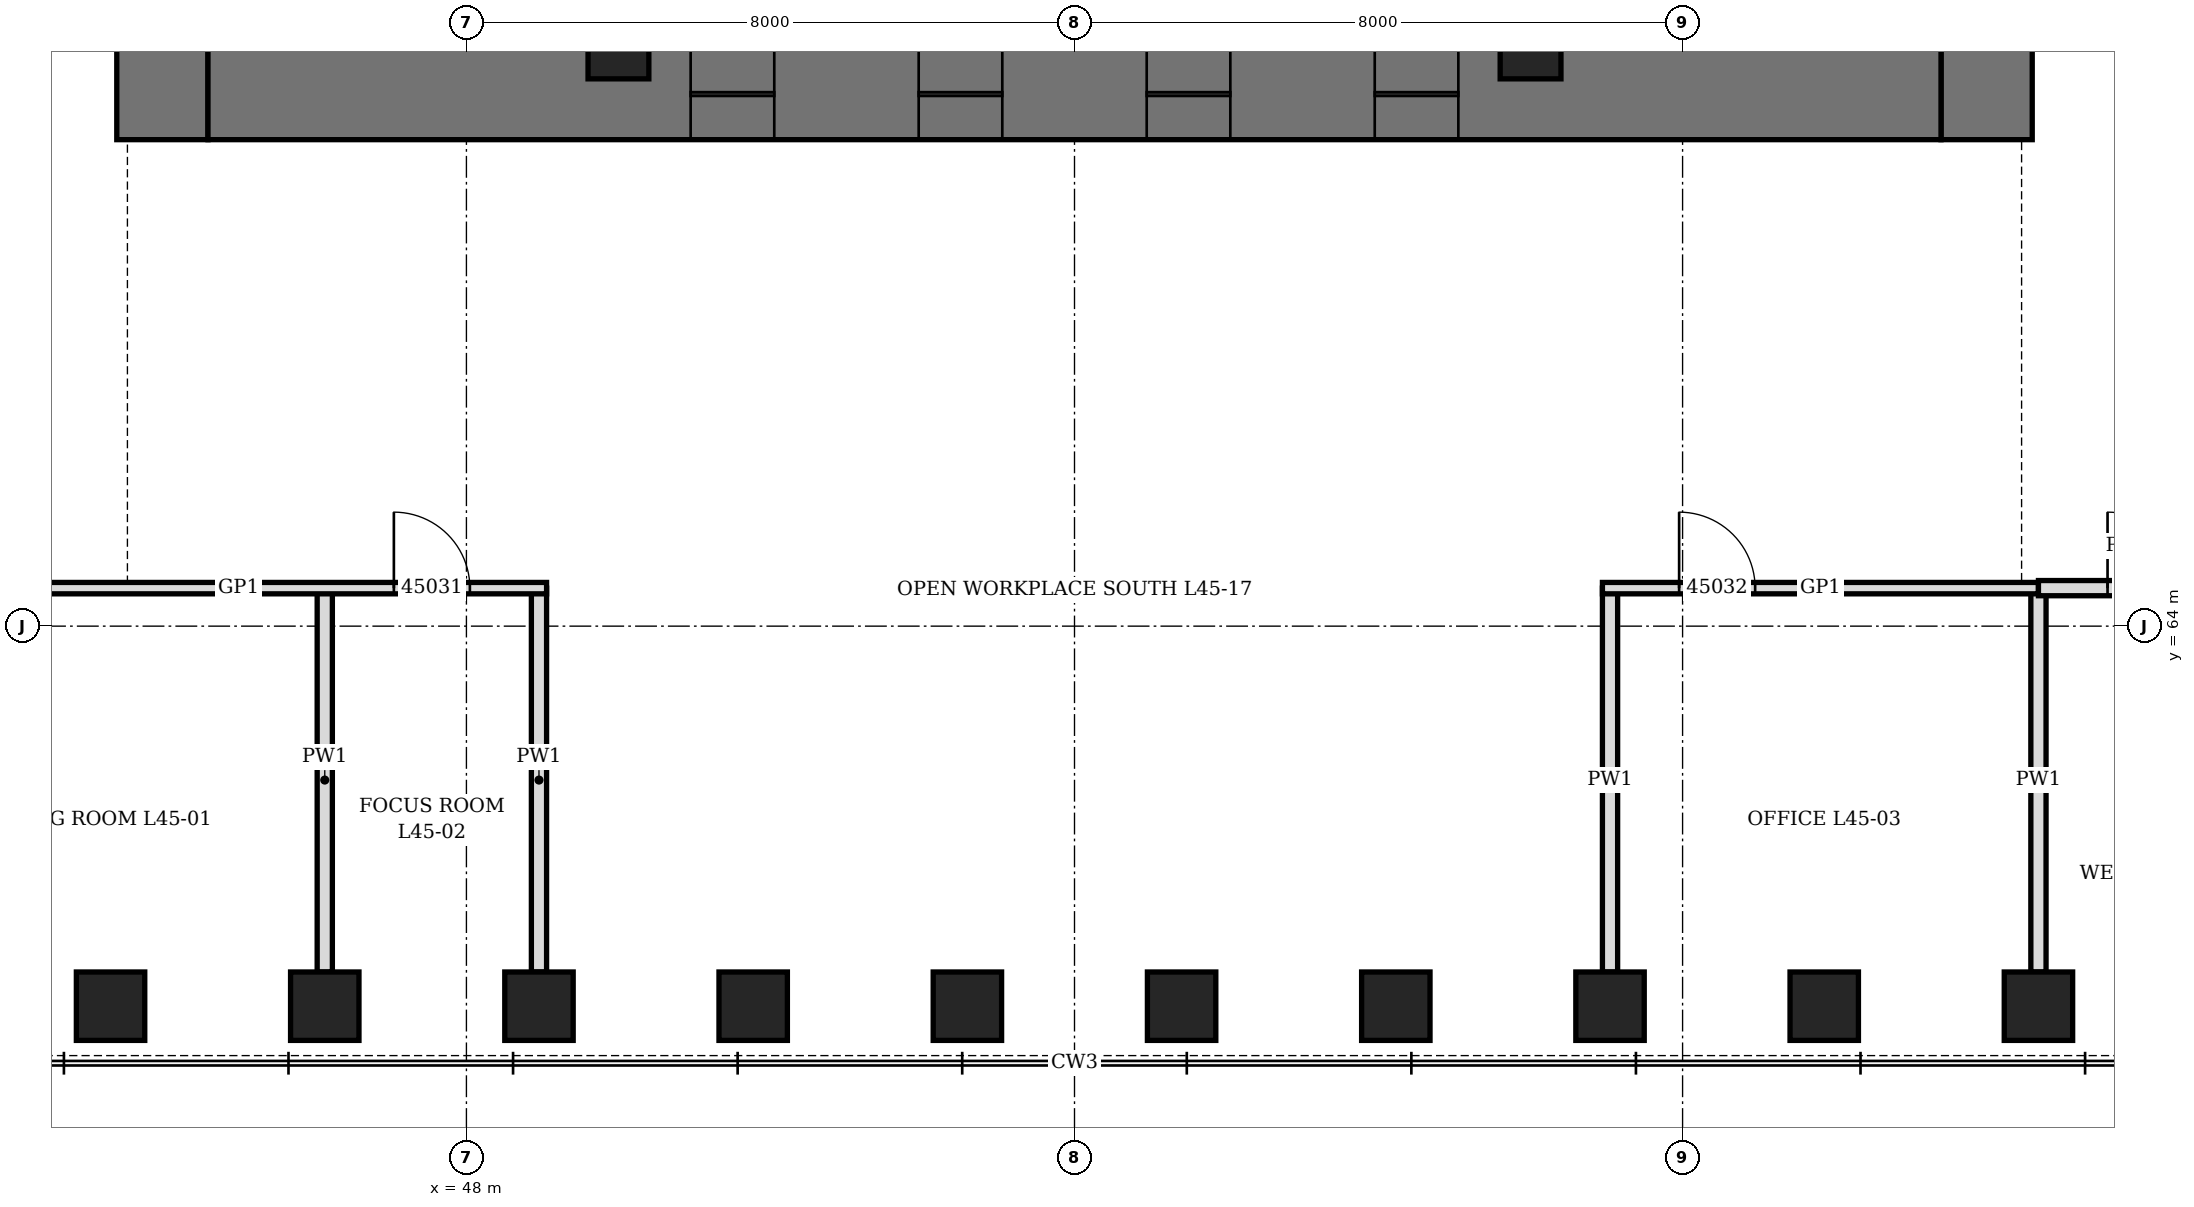
"""IFC4 building model, lengths in metres.
Left out: names, types, materials, properties, quantities, classifications, styles, units other than length and angle.
Written with IfcOpenShell. Run it as: python <this file> out.ifc"""

import sys

from ifc_helpers import new_model, si_unit, direction, frame, frame_2d, origin, origin_2d, place, context, subcontext, project, spatial, rectangle, hollow_rectangle, extrude, element, fill, save


model = new_model("IFC4")
c1 = context("Model", 3, precision=1e-05, world=origin(), true_north=direction((0.0, 1.0)))
c2 = subcontext(c1, "Body", "Model", "MODEL_VIEW")
j1 = project(units=[si_unit("LENGTHUNIT", "METRE"), si_unit("PLANEANGLEUNIT", "RADIAN")], contexts=[c1])
p1 = place(None, origin())
s1 = spatial("IfcSite", under=j1, at=p1, CompositionType="ELEMENT")
p2 = place(p1, origin())
s2 = spatial("IfcBuilding", under=s1, at=p2, CompositionType="ELEMENT")
p3 = place(p2, frame((0.0, 0.0, 202.3)))
s3 = spatial("IfcBuildingStorey", under=s2, at=p3, CompositionType="ELEMENT", Elevation=202.3)
for number, where, z_axis, x_axis in (
    (1, (43.318, 59.0, 0.0), (0.0, 0.0, 1.0), (1.0, 0.0, 0.0)),
    (2, (46.136, 59.0, 0.0), (0.0, 0.0, 1.0), (1.0, 0.0, 0.0)),
    (3, (48.955, 59.0, 0.0), (0.0, 0.0, 1.0), (1.0, 0.0, 0.0)),
    (4, (51.773, 59.0, 0.0), (0.0, 0.0, 1.0), (1.0, 0.0, 0.0)),
    (5, (54.591, 59.0, 0.0), (0.0, 0.0, 1.0), (1.0, 0.0, 0.0)),
    (6, (57.409, 59.0, 0.0), (0.0, 0.0, 1.0), (1.0, 0.0, 0.0)),
    (7, (60.227, 59.0, 0.0), (0.0, 0.0, 1.0), (1.0, 0.0, 0.0)),
    (8, (63.045, 59.0, 0.0), (0.0, 0.0, 1.0), (1.0, 0.0, 0.0)),
    (9, (65.864, 59.0, 0.0), (0.0, 0.0, 1.0), (1.0, 0.0, 0.0)),
    (10, (68.682, 59.0, 0.0), (0.0, 0.0, 1.0), (1.0, 0.0, 0.0)),
):
    element("IfcColumn", number, at=place(p3, frame(where, z_axis=z_axis, x_axis=x_axis)), inside=s3, PredefinedType="COLUMN", context=c2, shape_type="SweptSolid", body=[
        extrude(hollow_rectangle(XDim=0.9, YDim=0.9, WallThickness=0.12, at=origin_2d()), origin(), (0.0, 0.0, 1.0), 4.2),
    ])
p4 = place(p3, frame((44.0, 70.4, 0.0), z_axis=(0.0, 0.0, 1.0), x_axis=(0.0, 1.0, 0.0)))
e11 = element("IfcWall", 11, at=p4, inside=s3, PredefinedType="SHEAR", context=c2, shape_type="SweptSolid", body=[
    extrude(rectangle(XDim=19.2, YDim=1.2, at=frame_2d((9.6, 0.0))), origin(), (0.0, 0.0, 1.0), 4.2),
])
p5 = place(p4, frame((8.6, 0.0, 0.0)))
e12 = element("IfcOpeningElement", 12, at=p5, cuts=e11, PredefinedType="OPENING", context=c2, shape_type="SweptSolid", body=[
    extrude(rectangle(XDim=2.0, YDim=2.4, at=frame_2d((1.0, 1.2))), frame((0.0, 0.61, 0.0), z_axis=(0.0, -1.0, 0.0), x_axis=(1.0, 0.0, 0.0)), (0.0, 0.0, 1.0), 1.22),
])
p6 = place(p3, frame((68.0, 70.4, 0.0), z_axis=(0.0, 0.0, 1.0), x_axis=(0.0, 1.0, 0.0)))
e13 = element("IfcWall", 13, at=p6, inside=s3, PredefinedType="SHEAR", context=c2, shape_type="SweptSolid", body=[
    extrude(rectangle(XDim=19.2, YDim=1.2, at=frame_2d((9.6, 0.0))), origin(), (0.0, 0.0, 1.0), 4.2),
])
p7 = place(p6, frame((8.6, 0.0, 0.0)))
e14 = element("IfcOpeningElement", 14, at=p7, cuts=e13, PredefinedType="OPENING", context=c2, shape_type="SweptSolid", body=[
    extrude(rectangle(XDim=2.0, YDim=2.4, at=frame_2d((1.0, 1.2))), frame((0.0, 0.61, 0.0), z_axis=(0.0, -1.0, 0.0), x_axis=(1.0, 0.0, 0.0)), (0.0, 0.0, 1.0), 1.22),
])
p8 = place(p3, frame((44.6, 71.0, 0.0), z_axis=(0.0, 0.0, 1.0), x_axis=(1.0, 0.0, 0.0)))
e15 = element("IfcWall", 15, at=p8, inside=s3, PredefinedType="SHEAR", context=c2, shape_type="SweptSolid", body=[
    extrude(rectangle(XDim=22.8, YDim=1.2, at=frame_2d((11.4, 0.0))), origin(), (0.0, 0.0, 1.0), 4.2),
])
p9 = place(p8, frame((6.35, 0.0, 0.0)))
e16 = element("IfcOpeningElement", 16, at=p9, cuts=e15, PredefinedType="OPENING", context=c2, shape_type="SweptSolid", body=[
    extrude(rectangle(XDim=1.1, YDim=2.2, at=frame_2d((0.55, 1.1))), frame((0.0, 0.61, 0.0), z_axis=(0.0, -1.0, 0.0), x_axis=(1.0, 0.0, 0.0)), (0.0, 0.0, 1.0), 1.22),
])
p10 = place(p8, frame((9.35, 0.0, 0.0)))
e17 = element("IfcOpeningElement", 17, at=p10, cuts=e15, PredefinedType="OPENING", context=c2, shape_type="SweptSolid", body=[
    extrude(rectangle(XDim=1.1, YDim=2.2, at=frame_2d((0.55, 1.1))), frame((0.0, 0.61, 0.0), z_axis=(0.0, -1.0, 0.0), x_axis=(1.0, 0.0, 0.0)), (0.0, 0.0, 1.0), 1.22),
])
p11 = place(p8, frame((12.35, 0.0, 0.0)))
e18 = element("IfcOpeningElement", 18, at=p11, cuts=e15, PredefinedType="OPENING", context=c2, shape_type="SweptSolid", body=[
    extrude(rectangle(XDim=1.1, YDim=2.2, at=frame_2d((0.55, 1.1))), frame((0.0, 0.61, 0.0), z_axis=(0.0, -1.0, 0.0), x_axis=(1.0, 0.0, 0.0)), (0.0, 0.0, 1.0), 1.22),
])
p12 = place(p8, frame((15.35, 0.0, 0.0)))
e19 = element("IfcOpeningElement", 19, at=p12, cuts=e15, PredefinedType="OPENING", context=c2, shape_type="SweptSolid", body=[
    extrude(rectangle(XDim=1.1, YDim=2.2, at=frame_2d((0.55, 1.1))), frame((0.0, 0.61, 0.0), z_axis=(0.0, -1.0, 0.0), x_axis=(1.0, 0.0, 0.0)), (0.0, 0.0, 1.0), 1.22),
])
for number, where, z_axis, x_axis in (
    (20, (50.0, 71.6, 0.0), (0.0, 0.0, 1.0), (1.0, 0.0, 0.0)),
    (21, (62.0, 71.6, 0.0), (0.0, 0.0, 1.0), (1.0, 0.0, 0.0)),
):
    element("IfcColumn", number, at=place(p3, frame(where, z_axis=z_axis, x_axis=x_axis)), inside=s3, PredefinedType="COLUMN", context=c2, shape_type="SweptSolid", body=[
        extrude(hollow_rectangle(XDim=0.8, YDim=0.8, WallThickness=0.1, at=origin_2d()), origin(), (0.0, 0.0, 1.0), 4.2),
    ])
for number, where, z_axis, x_axis in (
    (22, (46.136, 59.45, 0.0), (0.0, 0.0, 1.0), (0.0, 1.0, 0.0)),
    (23, (48.955, 59.45, 0.0), (0.0, 0.0, 1.0), (0.0, 1.0, 0.0)),
    (24, (63.045, 59.45, 0.0), (0.0, 0.0, 1.0), (0.0, 1.0, 0.0)),
    (25, (68.682, 59.45, 0.0), (0.0, 0.0, 1.0), (0.0, 1.0, 0.0)),
):
    element("IfcWall", number, at=place(p3, frame(where, z_axis=z_axis, x_axis=x_axis)), inside=s3, PredefinedType="PARTITIONING", context=c2, shape_type="SweptSolid", body=[
        extrude(rectangle(XDim=5.05, YDim=0.2, at=frame_2d((2.525, 0.0))), origin(), (0.0, 0.0, 1.0), 3.428),
    ])
p13 = place(p3, frame((40.95, 64.5, 0.0), z_axis=(0.0, 0.0, 1.0), x_axis=(1.0, 0.0, 0.0)))
e26 = element("IfcWall", 26, at=p13, inside=s3, PredefinedType="PARTITIONING", context=c2, shape_type="SweptSolid", body=[
    extrude(rectangle(XDim=8.104, YDim=0.15, at=frame_2d((4.052, 0.0))), origin(), (0.0, 0.0, 1.0), 4.04),
])
p14 = place(p13, frame((0.459, 0.0, 0.0)))
e27 = element("IfcOpeningElement", 27, at=p14, cuts=e26, PredefinedType="OPENING", context=c2, shape_type="SweptSolid", body=[
    extrude(rectangle(XDim=1.0, YDim=2.4, at=frame_2d((0.5, 1.2))), frame((0.0, 0.085, 0.0), z_axis=(0.0, -1.0, 0.0), x_axis=(1.0, 0.0, 0.0)), (0.0, 0.0, 1.0), 0.17),
])
p15 = place(p13, frame((6.095, 0.0, 0.0)))
e28 = element("IfcOpeningElement", 28, at=p15, cuts=e26, PredefinedType="OPENING", context=c2, shape_type="SweptSolid", body=[
    extrude(rectangle(XDim=1.0, YDim=2.4, at=frame_2d((0.5, 1.2))), frame((0.0, 0.085, 0.0), z_axis=(0.0, -1.0, 0.0), x_axis=(1.0, 0.0, 0.0)), (0.0, 0.0, 1.0), 0.17),
])
p16 = place(p3, frame((62.946, 64.5, 0.0), z_axis=(0.0, 0.0, 1.0), x_axis=(1.0, 0.0, 0.0)))
e29 = element("IfcWall", 29, at=p16, inside=s3, PredefinedType="PARTITIONING", context=c2, shape_type="SweptSolid", body=[
    extrude(rectangle(XDim=5.736, YDim=0.15, at=frame_2d((2.868, 0.0))), origin(), (0.0, 0.0, 1.0), 4.04),
])
p17 = place(p16, frame((1.009, 0.0, 0.0)))
e30 = element("IfcOpeningElement", 30, at=p17, cuts=e29, PredefinedType="OPENING", context=c2, shape_type="SweptSolid", body=[
    extrude(rectangle(XDim=1.0, YDim=2.1, at=frame_2d((0.5, 1.05))), frame((0.0, 0.085, 0.0), z_axis=(0.0, -1.0, 0.0), x_axis=(1.0, 0.0, 0.0)), (0.0, 0.0, 1.0), 0.17),
])
p18 = place(p3, frame((68.682, 64.5, 0.0), z_axis=(0.0, 0.0, 1.0), x_axis=(1.0, 0.0, 0.0)))
e31 = element("IfcWall", 31, at=p18, inside=s3, PredefinedType="PARTITIONING", context=c2, shape_type="SweptSolid", body=[
    extrude(rectangle(XDim=2.368, YDim=0.2, at=frame_2d((1.184, 0.0))), origin(), (0.0, 0.0, 1.0), 4.04),
])
p19 = place(p18, frame((0.909, 0.0, 0.0)))
e32 = element("IfcOpeningElement", 32, at=p19, cuts=e31, PredefinedType="OPENING", context=c2, shape_type="SweptSolid", body=[
    extrude(rectangle(XDim=1.0, YDim=2.1, at=frame_2d((0.5, 1.05))), frame((0.0, 0.11, 0.0), z_axis=(0.0, -1.0, 0.0), x_axis=(1.0, 0.0, 0.0)), (0.0, 0.0, 1.0), 0.22),
])
p20 = place(p9, origin())
e33 = element("IfcDoor", 33, at=p20, inside=s3, OperationType="SLIDING_TO_LEFT", PredefinedType="DOOR", context=c2, shape_type="SweptSolid", body=[
    extrude(rectangle(XDim=1.1, YDim=2.2, at=frame_2d((0.55, 1.1))), frame((0.0, 0.35, 0.0), z_axis=(0.0, -1.0, 0.0), x_axis=(1.0, 0.0, 0.0)), (0.0, 0.0, 1.0), 0.7),
])
fill(e16, e33)
p21 = place(p10, origin())
e34 = element("IfcDoor", 34, at=p21, inside=s3, OperationType="SLIDING_TO_LEFT", PredefinedType="DOOR", context=c2, shape_type="SweptSolid", body=[
    extrude(rectangle(XDim=1.1, YDim=2.2, at=frame_2d((0.55, 1.1))), frame((0.0, 0.35, 0.0), z_axis=(0.0, -1.0, 0.0), x_axis=(1.0, 0.0, 0.0)), (0.0, 0.0, 1.0), 0.7),
])
fill(e17, e34)
p22 = place(p11, origin())
e35 = element("IfcDoor", 35, at=p22, inside=s3, OperationType="SLIDING_TO_LEFT", PredefinedType="DOOR", context=c2, shape_type="SweptSolid", body=[
    extrude(rectangle(XDim=1.1, YDim=2.2, at=frame_2d((0.55, 1.1))), frame((0.0, 0.35, 0.0), z_axis=(0.0, -1.0, 0.0), x_axis=(1.0, 0.0, 0.0)), (0.0, 0.0, 1.0), 0.7),
])
fill(e18, e35)
p23 = place(p12, origin())
e36 = element("IfcDoor", 36, at=p23, inside=s3, OperationType="SLIDING_TO_LEFT", PredefinedType="DOOR", context=c2, shape_type="SweptSolid", body=[
    extrude(rectangle(XDim=1.1, YDim=2.2, at=frame_2d((0.55, 1.1))), frame((0.0, 0.35, 0.0), z_axis=(0.0, -1.0, 0.0), x_axis=(1.0, 0.0, 0.0)), (0.0, 0.0, 1.0), 0.7),
])
fill(e19, e36)
p24 = place(p15, origin())
e37 = element("IfcDoor", 37, at=p24, inside=s3, OperationType="SINGLE_SWING_RIGHT", PredefinedType="DOOR", context=c2, shape_type="SweptSolid", body=[
    extrude(rectangle(XDim=1.0, YDim=2.4, at=frame_2d((0.5, 1.2))), frame((0.0, 0.075, 0.0), z_axis=(0.0, -1.0, 0.0), x_axis=(1.0, 0.0, 0.0)), (0.0, 0.0, 1.0), 0.149),
])
fill(e28, e37)
p25 = place(p17, origin())
e38 = element("IfcDoor", 38, at=p25, inside=s3, OperationType="SINGLE_SWING_LEFT", PredefinedType="DOOR", context=c2, shape_type="SweptSolid", body=[
    extrude(rectangle(XDim=1.0, YDim=2.1, at=frame_2d((0.5, 1.05))), frame((0.0, 0.075, 0.0), z_axis=(0.0, -1.0, 0.0), x_axis=(1.0, 0.0, 0.0)), (0.0, 0.0, 1.0), 0.149),
])
fill(e30, e38)
p26 = place(p19, origin())
e39 = element("IfcDoor", 39, at=p26, inside=s3, OperationType="SINGLE_SWING_LEFT", PredefinedType="DOOR", context=c2, shape_type="SweptSolid", body=[
    extrude(rectangle(XDim=1.0, YDim=2.1, at=frame_2d((0.5, 1.05))), frame((0.0, 0.1, 0.0), z_axis=(0.0, -1.0, 0.0), x_axis=(1.0, 0.0, 0.0)), (0.0, 0.0, 1.0), 0.199),
])
fill(e32, e39)
save(model, sys.argv[1])
